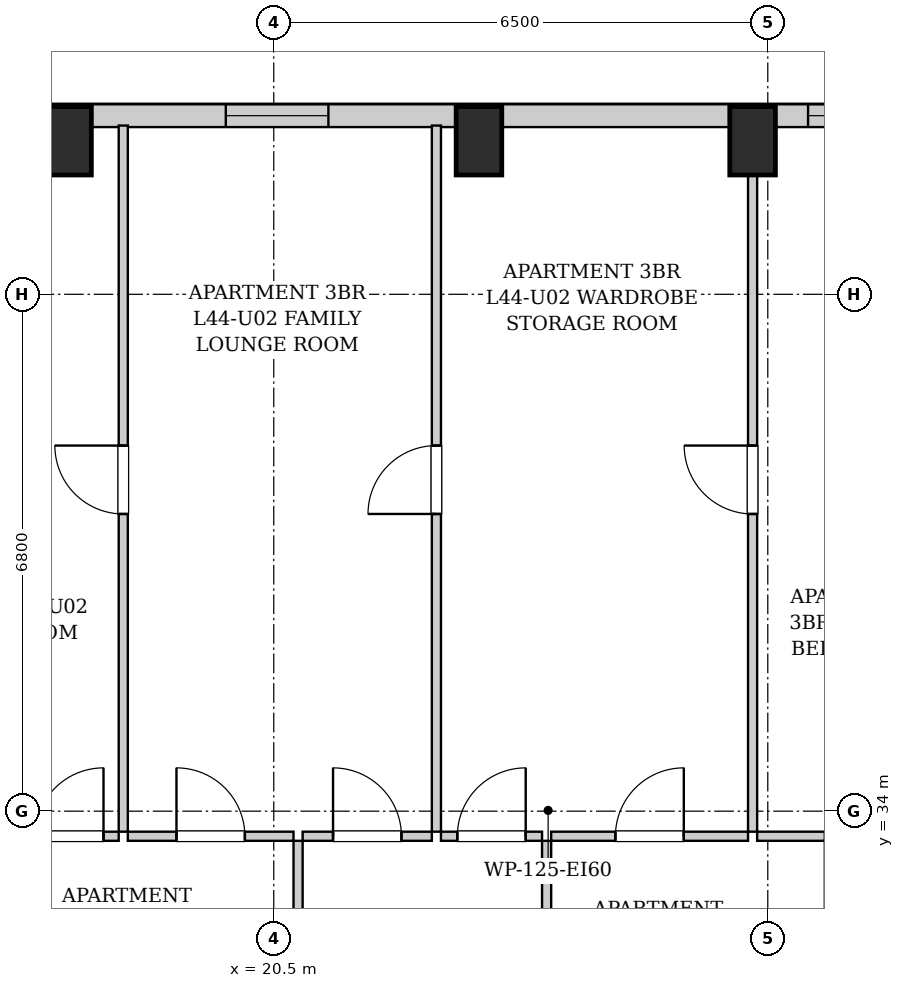
"""IFC4 building model, lengths in metres.
Left out: names, types, materials, properties, quantities, classifications, styles, units other than length and angle.
Written with IfcOpenShell. Run it as: python <this file> out.ifc"""

import sys

from ifc_helpers import new_model, si_unit, direction, frame, frame_2d, origin, origin_2d, place, context, subcontext, project, spatial, rectangle, extrude, element, fill, save


model = new_model("IFC4")
c1 = context("Model", 3, precision=1e-05, world=origin(), true_north=direction((0.0, 1.0)))
c2 = subcontext(c1, "Body", "Model", "MODEL_VIEW")
j1 = project(units=[si_unit("LENGTHUNIT", "METRE"), si_unit("PLANEANGLEUNIT", "RADIAN")], contexts=[c1])
p1 = place(None, origin())
s1 = spatial("IfcSite", under=j1, at=p1, CompositionType="ELEMENT")
p2 = place(p1, origin())
s2 = spatial("IfcBuilding", under=s1, at=p2, CompositionType="ELEMENT")
p3 = place(p2, frame((0.0, 0.0, 153.65)))
s3 = spatial("IfcBuildingStorey", under=s2, at=p3, CompositionType="ELEMENT", Elevation=153.65)
for number, where, z_axis, x_axis in (
    (1, (17.8, 42.82, 0.0), (0.0, 0.0, 1.0), (1.0, 0.0, 0.0)),
    (2, (23.2, 42.82, 0.0), (0.0, 0.0, 1.0), (1.0, 0.0, 0.0)),
    (3, (26.8, 42.82, 0.0), (0.0, 0.0, 1.0), (1.0, 0.0, 0.0)),
):
    element("IfcColumn", number, at=place(p3, frame(where, z_axis=z_axis, x_axis=x_axis)), inside=s3, PredefinedType="COLUMN", context=c2, shape_type="SweptSolid", body=[
        extrude(rectangle(XDim=0.6, YDim=0.9, at=origin_2d()), origin(), (0.0, 0.0, 1.0), 3.25),
    ])
p4 = place(p3, frame((16.6, 43.15, 0.0), z_axis=(0.0, 0.0, 1.0), x_axis=(1.0, 0.0, 0.0)))
e4 = element("IfcWall", 4, at=p4, inside=s3, PredefinedType="SOLIDWALL", context=c2, shape_type="SweptSolid", body=[
    extrude(rectangle(XDim=13.35, YDim=0.3, at=frame_2d((6.675, 0.0))), origin(), (0.0, 0.0, 1.0), 2.99),
])
p5 = place(p4, frame((3.269, 0.0, 0.55)))
e5 = element("IfcOpeningElement", 5, at=p5, cuts=e4, PredefinedType="OPENING", context=c2, shape_type="SweptSolid", body=[
    extrude(rectangle(XDim=1.35, YDim=1.2, at=frame_2d((0.675, 0.6))), frame((0.0, 0.16, 0.0), z_axis=(0.0, -1.0, 0.0), x_axis=(1.0, 0.0, 0.0)), (0.0, 0.0, 1.0), 0.32),
])
p6 = place(p4, frame((10.93, 0.0, 0.55)))
e6 = element("IfcOpeningElement", 6, at=p6, cuts=e4, PredefinedType="OPENING", context=c2, shape_type="SweptSolid", body=[
    extrude(rectangle(XDim=1.35, YDim=1.2, at=frame_2d((0.675, 0.6))), frame((0.0, 0.16, 0.0), z_axis=(0.0, -1.0, 0.0), x_axis=(1.0, 0.0, 0.0)), (0.0, 0.0, 1.0), 0.32),
])
p7 = place(p3, frame((20.82, 30.76, 0.0), z_axis=(0.0, 0.0, 1.0), x_axis=(0.0, 1.0, 0.0)))
e7 = element("IfcWall", 7, at=p7, inside=s3, PredefinedType="PARTITIONING", context=c2, shape_type="SweptSolid", body=[
    extrude(rectangle(XDim=2.85, YDim=0.12, at=frame_2d((1.425, 0.0))), origin(), (0.0, 0.0, 1.0), 2.99),
])
p8 = place(p7, frame((0.975, 0.0, 0.0)))
e8 = element("IfcOpeningElement", 8, at=p8, cuts=e7, PredefinedType="OPENING", context=c2, shape_type="SweptSolid", body=[
    extrude(rectangle(XDim=0.9, YDim=2.05, at=frame_2d((0.45, 1.025))), frame((0.0, 0.07, 0.0), z_axis=(0.0, -1.0, 0.0), x_axis=(1.0, 0.0, 0.0)), (0.0, 0.0, 1.0), 0.14),
])
p9 = place(p3, frame((17.16, 33.67, 0.0), z_axis=(0.0, 0.0, 1.0), x_axis=(1.0, 0.0, 0.0)))
e9 = element("IfcWall", 9, at=p9, inside=s3, PredefinedType="PARTITIONING", context=c2, shape_type="SweptSolid", body=[
    extrude(rectangle(XDim=1.3, YDim=0.12, at=frame_2d((0.65, 0.0))), origin(), (0.0, 0.0, 1.0), 2.99),
])
p10 = place(p9, frame((0.2, 0.0, 0.0)))
e10 = element("IfcOpeningElement", 10, at=p10, cuts=e9, PredefinedType="OPENING", context=c2, shape_type="SweptSolid", body=[
    extrude(rectangle(XDim=0.9, YDim=2.05, at=frame_2d((0.45, 1.025))), frame((0.0, 0.07, 0.0), z_axis=(0.0, -1.0, 0.0), x_axis=(1.0, 0.0, 0.0)), (0.0, 0.0, 1.0), 0.14),
])
p11 = place(p3, frame((18.58, 33.67, 0.0), z_axis=(0.0, 0.0, 1.0), x_axis=(1.0, 0.0, 0.0)))
e11 = element("IfcWall", 11, at=p11, inside=s3, PredefinedType="PARTITIONING", context=c2, shape_type="SweptSolid", body=[
    extrude(rectangle(XDim=2.18, YDim=0.12, at=frame_2d((1.09, 0.0))), origin(), (0.0, 0.0, 1.0), 2.99),
])
p12 = place(p11, frame((0.64, 0.0, 0.0)))
e12 = element("IfcOpeningElement", 12, at=p12, cuts=e11, PredefinedType="OPENING", context=c2, shape_type="SweptSolid", body=[
    extrude(rectangle(XDim=0.9, YDim=2.05, at=frame_2d((0.45, 1.025))), frame((0.0, 0.07, 0.0), z_axis=(0.0, -1.0, 0.0), x_axis=(1.0, 0.0, 0.0)), (0.0, 0.0, 1.0), 0.14),
])
p13 = place(p3, frame((24.09, 30.76, 0.0), z_axis=(0.0, 0.0, 1.0), x_axis=(0.0, 1.0, 0.0)))
e13 = element("IfcWall", 13, at=p13, inside=s3, PredefinedType="PARTITIONING", context=c2, shape_type="SweptSolid", body=[
    extrude(rectangle(XDim=2.85, YDim=0.12, at=frame_2d((1.425, 0.0))), origin(), (0.0, 0.0, 1.0), 2.99),
])
p14 = place(p13, frame((0.975, 0.0, 0.0)))
e14 = element("IfcOpeningElement", 14, at=p14, cuts=e13, PredefinedType="OPENING", context=c2, shape_type="SweptSolid", body=[
    extrude(rectangle(XDim=0.9, YDim=2.05, at=frame_2d((0.45, 1.025))), frame((0.0, 0.07, 0.0), z_axis=(0.0, -1.0, 0.0), x_axis=(1.0, 0.0, 0.0)), (0.0, 0.0, 1.0), 0.14),
])
p15 = place(p3, frame((20.88, 33.67, 0.0), z_axis=(0.0, 0.0, 1.0), x_axis=(1.0, 0.0, 0.0)))
e15 = element("IfcWall", 15, at=p15, inside=s3, PredefinedType="PARTITIONING", context=c2, shape_type="SweptSolid", body=[
    extrude(rectangle(XDim=1.7, YDim=0.12, at=frame_2d((0.85, 0.0))), origin(), (0.0, 0.0, 1.0), 2.99),
])
p16 = place(p15, frame((0.4, 0.0, 0.0)))
e16 = element("IfcOpeningElement", 16, at=p16, cuts=e15, PredefinedType="OPENING", context=c2, shape_type="SweptSolid", body=[
    extrude(rectangle(XDim=0.9, YDim=2.05, at=frame_2d((0.45, 1.025))), frame((0.0, 0.07, 0.0), z_axis=(0.0, -1.0, 0.0), x_axis=(1.0, 0.0, 0.0)), (0.0, 0.0, 1.0), 0.14),
])
p17 = place(p3, frame((22.7, 33.67, 0.0), z_axis=(0.0, 0.0, 1.0), x_axis=(1.0, 0.0, 0.0)))
e17 = element("IfcWall", 17, at=p17, inside=s3, PredefinedType="PARTITIONING", context=c2, shape_type="SweptSolid", body=[
    extrude(rectangle(XDim=1.33, YDim=0.12, at=frame_2d((0.665, 0.0))), origin(), (0.0, 0.0, 1.0), 2.99),
])
p18 = place(p17, frame((0.215, 0.0, 0.0)))
e18 = element("IfcOpeningElement", 18, at=p18, cuts=e17, PredefinedType="OPENING", context=c2, shape_type="SweptSolid", body=[
    extrude(rectangle(XDim=0.9, YDim=2.05, at=frame_2d((0.45, 1.025))), frame((0.0, 0.07, 0.0), z_axis=(0.0, -1.0, 0.0), x_axis=(1.0, 0.0, 0.0)), (0.0, 0.0, 1.0), 0.14),
])
p19 = place(p3, frame((24.15, 33.67, 0.0), z_axis=(0.0, 0.0, 1.0), x_axis=(1.0, 0.0, 0.0)))
e19 = element("IfcWall", 19, at=p19, inside=s3, PredefinedType="PARTITIONING", context=c2, shape_type="SweptSolid", body=[
    extrude(rectangle(XDim=2.59, YDim=0.12, at=frame_2d((1.295, 0.0))), origin(), (0.0, 0.0, 1.0), 2.99),
])
p20 = place(p19, frame((0.845, 0.0, 0.0)))
e20 = element("IfcOpeningElement", 20, at=p20, cuts=e19, PredefinedType="OPENING", context=c2, shape_type="SweptSolid", body=[
    extrude(rectangle(XDim=0.9, YDim=2.05, at=frame_2d((0.45, 1.025))), frame((0.0, 0.07, 0.0), z_axis=(0.0, -1.0, 0.0), x_axis=(1.0, 0.0, 0.0)), (0.0, 0.0, 1.0), 0.14),
])
p21 = place(p3, frame((26.86, 33.67, 0.0), z_axis=(0.0, 0.0, 1.0), x_axis=(1.0, 0.0, 0.0)))
e21 = element("IfcWall", 21, at=p21, inside=s3, PredefinedType="PARTITIONING", context=c2, shape_type="SweptSolid", body=[
    extrude(rectangle(XDim=0.89, YDim=0.12, at=frame_2d((0.445, 0.0))), origin(), (0.0, 0.0, 1.0), 2.99),
])
p22 = place(p3, frame((18.52, 33.73, 0.0), z_axis=(0.0, 0.0, 1.0), x_axis=(0.0, 1.0, 0.0)))
e22 = element("IfcWall", 22, at=p22, inside=s3, PredefinedType="PARTITIONING", context=c2, shape_type="SweptSolid", body=[
    extrude(rectangle(XDim=9.29, YDim=0.12, at=frame_2d((4.645, 0.0))), origin(), (0.0, 0.0, 1.0), 2.99),
])
p23 = place(p22, frame((4.18, 0.0, 0.0)))
e23 = element("IfcOpeningElement", 23, at=p23, cuts=e22, PredefinedType="OPENING", context=c2, shape_type="SweptSolid", body=[
    extrude(rectangle(XDim=0.9, YDim=2.05, at=frame_2d((0.45, 1.025))), frame((0.0, 0.07, 0.0), z_axis=(0.0, -1.0, 0.0), x_axis=(1.0, 0.0, 0.0)), (0.0, 0.0, 1.0), 0.14),
])
p24 = place(p3, frame((22.64, 33.73, 0.0), z_axis=(0.0, 0.0, 1.0), x_axis=(0.0, 1.0, 0.0)))
e24 = element("IfcWall", 24, at=p24, inside=s3, PredefinedType="PARTITIONING", context=c2, shape_type="SweptSolid", body=[
    extrude(rectangle(XDim=9.29, YDim=0.12, at=frame_2d((4.645, 0.0))), origin(), (0.0, 0.0, 1.0), 2.99),
])
p25 = place(p24, frame((4.18, 0.0, 0.0)))
e25 = element("IfcOpeningElement", 25, at=p25, cuts=e24, PredefinedType="OPENING", context=c2, shape_type="SweptSolid", body=[
    extrude(rectangle(XDim=0.9, YDim=2.05, at=frame_2d((0.45, 1.025))), frame((0.0, 0.07, 0.0), z_axis=(0.0, -1.0, 0.0), x_axis=(1.0, 0.0, 0.0)), (0.0, 0.0, 1.0), 0.14),
])
p26 = place(p3, frame((26.8, 33.73, 0.0), z_axis=(0.0, 0.0, 1.0), x_axis=(0.0, 1.0, 0.0)))
e26 = element("IfcWall", 26, at=p26, inside=s3, PredefinedType="PARTITIONING", context=c2, shape_type="SweptSolid", body=[
    extrude(rectangle(XDim=9.29, YDim=0.12, at=frame_2d((4.645, 0.0))), origin(), (0.0, 0.0, 1.0), 2.99),
])
p27 = place(p26, frame((4.18, 0.0, 0.0)))
e27 = element("IfcOpeningElement", 27, at=p27, cuts=e26, PredefinedType="OPENING", context=c2, shape_type="SweptSolid", body=[
    extrude(rectangle(XDim=0.9, YDim=2.05, at=frame_2d((0.45, 1.025))), frame((0.0, 0.07, 0.0), z_axis=(0.0, -1.0, 0.0), x_axis=(1.0, 0.0, 0.0)), (0.0, 0.0, 1.0), 0.14),
])
p28 = place(p10, origin())
e28 = element("IfcDoor", 28, at=p28, inside=s3, OperationType="SINGLE_SWING_RIGHT", PredefinedType="DOOR", context=c2, shape_type="SweptSolid", body=[
    extrude(rectangle(XDim=0.9, YDim=2.05, at=frame_2d((0.45, 1.025))), frame((0.0, 0.025, 0.0), z_axis=(0.0, -1.0, 0.0), x_axis=(1.0, 0.0, 0.0)), (0.0, 0.0, 1.0), 0.05),
])
fill(e10, e28)
p29 = place(p12, origin())
e29 = element("IfcDoor", 29, at=p29, inside=s3, OperationType="SINGLE_SWING_LEFT", PredefinedType="DOOR", context=c2, shape_type="SweptSolid", body=[
    extrude(rectangle(XDim=0.9, YDim=2.05, at=frame_2d((0.45, 1.025))), frame((0.0, 0.025, 0.0), z_axis=(0.0, -1.0, 0.0), x_axis=(1.0, 0.0, 0.0)), (0.0, 0.0, 1.0), 0.05),
])
fill(e12, e29)
p30 = place(p16, origin())
e30 = element("IfcDoor", 30, at=p30, inside=s3, OperationType="SINGLE_SWING_LEFT", PredefinedType="DOOR", context=c2, shape_type="SweptSolid", body=[
    extrude(rectangle(XDim=0.9, YDim=2.05, at=frame_2d((0.45, 1.025))), frame((0.0, 0.025, 0.0), z_axis=(0.0, -1.0, 0.0), x_axis=(1.0, 0.0, 0.0)), (0.0, 0.0, 1.0), 0.05),
])
fill(e16, e30)
p31 = place(p18, origin())
e31 = element("IfcDoor", 31, at=p31, inside=s3, OperationType="SINGLE_SWING_RIGHT", PredefinedType="DOOR", context=c2, shape_type="SweptSolid", body=[
    extrude(rectangle(XDim=0.9, YDim=2.05, at=frame_2d((0.45, 1.025))), frame((0.0, 0.025, 0.0), z_axis=(0.0, -1.0, 0.0), x_axis=(1.0, 0.0, 0.0)), (0.0, 0.0, 1.0), 0.05),
])
fill(e18, e31)
p32 = place(p20, origin())
e32 = element("IfcDoor", 32, at=p32, inside=s3, OperationType="SINGLE_SWING_RIGHT", PredefinedType="DOOR", context=c2, shape_type="SweptSolid", body=[
    extrude(rectangle(XDim=0.9, YDim=2.05, at=frame_2d((0.45, 1.025))), frame((0.0, 0.025, 0.0), z_axis=(0.0, -1.0, 0.0), x_axis=(1.0, 0.0, 0.0)), (0.0, 0.0, 1.0), 0.05),
])
fill(e20, e32)
p33 = place(p23, origin())
e33 = element("IfcDoor", 33, at=p33, inside=s3, OperationType="SINGLE_SWING_RIGHT", PredefinedType="DOOR", context=c2, shape_type="SweptSolid", body=[
    extrude(rectangle(XDim=0.9, YDim=2.05, at=frame_2d((0.45, 1.025))), frame((0.0, 0.025, 0.0), z_axis=(0.0, -1.0, 0.0), x_axis=(1.0, 0.0, 0.0)), (0.0, 0.0, 1.0), 0.05),
])
fill(e23, e33)
p34 = place(p25, origin())
e34 = element("IfcDoor", 34, at=p34, inside=s3, OperationType="SINGLE_SWING_LEFT", PredefinedType="DOOR", context=c2, shape_type="SweptSolid", body=[
    extrude(rectangle(XDim=0.9, YDim=2.05, at=frame_2d((0.45, 1.025))), frame((0.0, 0.025, 0.0), z_axis=(0.0, -1.0, 0.0), x_axis=(1.0, 0.0, 0.0)), (0.0, 0.0, 1.0), 0.05),
])
fill(e25, e34)
p35 = place(p27, origin())
e35 = element("IfcDoor", 35, at=p35, inside=s3, OperationType="SINGLE_SWING_RIGHT", PredefinedType="DOOR", context=c2, shape_type="SweptSolid", body=[
    extrude(rectangle(XDim=0.9, YDim=2.05, at=frame_2d((0.45, 1.025))), frame((0.0, 0.025, 0.0), z_axis=(0.0, -1.0, 0.0), x_axis=(1.0, 0.0, 0.0)), (0.0, 0.0, 1.0), 0.05),
])
fill(e27, e35)
p36 = place(p5, origin())
e36 = element("IfcWindow", 36, at=p36, inside=s3, PartitioningType="SINGLE_PANEL", PredefinedType="WINDOW", context=c2, shape_type="SweptSolid", body=[
    extrude(rectangle(XDim=1.35, YDim=1.2, at=frame_2d((0.675, 0.6))), frame((0.0, 0.03, 0.0), z_axis=(0.0, -1.0, 0.0), x_axis=(1.0, 0.0, 0.0)), (0.0, 0.0, 1.0), 0.06),
])
fill(e5, e36)
p37 = place(p6, origin())
e37 = element("IfcWindow", 37, at=p37, inside=s3, PartitioningType="SINGLE_PANEL", PredefinedType="WINDOW", context=c2, shape_type="SweptSolid", body=[
    extrude(rectangle(XDim=1.35, YDim=1.2, at=frame_2d((0.675, 0.6))), frame((0.0, 0.03, 0.0), z_axis=(0.0, -1.0, 0.0), x_axis=(1.0, 0.0, 0.0)), (0.0, 0.0, 1.0), 0.06),
])
fill(e6, e37)
save(model, sys.argv[1])
